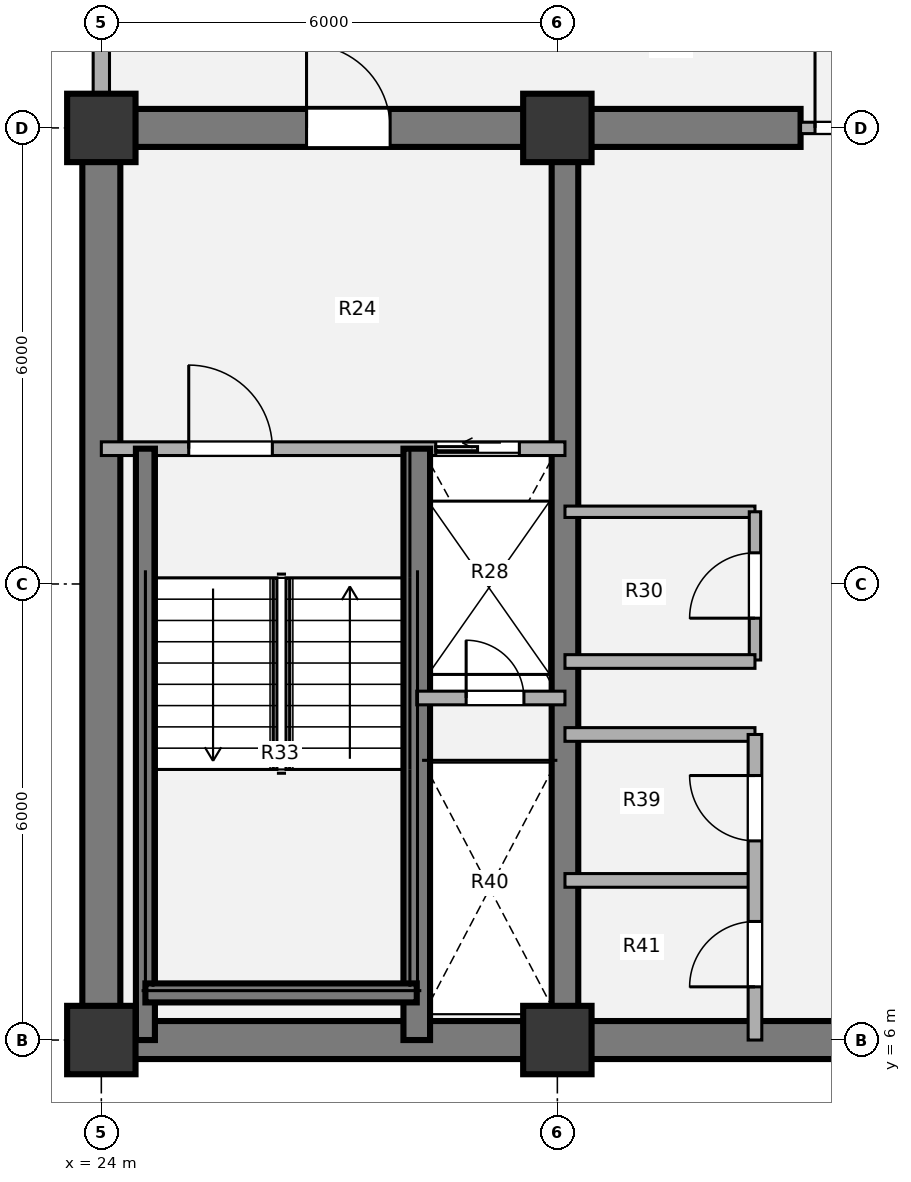
"""IFC4 building model, lengths in metres.
Left out: names, types, materials, properties, quantities, classifications, styles, units other than length and angle.
Written with IfcOpenShell. Run it as: python <this file> out.ifc"""

import sys

from ifc_helpers import new_model, si_unit, direction, frame, frame_2d, origin, origin_2d, place, context, subcontext, project, spatial, rectangle, extrude, source, transform, mapped, element, fill, save


model = new_model("IFC4")
c1 = context("Model", 3, precision=1e-05, world=origin(), true_north=direction((0.0, 1.0)))
c2 = subcontext(c1, "Body", "Model", "MODEL_VIEW")
j1 = project(units=[si_unit("LENGTHUNIT", "METRE"), si_unit("PLANEANGLEUNIT", "RADIAN")], contexts=[c1])
p1 = place(None, origin())
s1 = spatial("IfcSite", under=j1, at=p1, CompositionType="ELEMENT")
p2 = place(p1, origin())
s2 = spatial("IfcBuilding", under=s1, at=p2, CompositionType="ELEMENT")
p3 = place(p2, frame((0.0, 0.0, 97.38)))
s3 = spatial("IfcBuildingStorey", under=s2, at=p3, CompositionType="ELEMENT", Elevation=97.38)
m1 = source(origin(), c2, "Body", "SweptSolid", [
    extrude(rectangle(XDim=0.9, YDim=0.9, at=origin_2d()), origin(), (0.0, 0.0, 1.0), 3.78),
])
for number, where, z_axis, x_axis in (
    (1, (24.0, 6.0, 0.0), (0.0, 0.0, 1.0), (1.0, 0.0, 0.0)),
    (2, (30.0, 6.0, 0.0), (0.0, 0.0, 1.0), (1.0, 0.0, 0.0)),
    (3, (24.0, 18.0, 0.0), (0.0, 0.0, 1.0), (1.0, 0.0, 0.0)),
    (4, (30.0, 18.0, 0.0), (0.0, 0.0, 1.0), (1.0, 0.0, 0.0)),
):
    element("IfcColumn", number, at=place(p3, frame(where, z_axis=z_axis, x_axis=x_axis)), inside=s3, PredefinedType="COLUMN", context=c2, shape_type="MappedRepresentation", body=[
        mapped(m1, transform((0.0, 0.0, 0.0), x_axis=(1.0, 0.0, 0.0), y_axis=(0.0, 1.0, 0.0), z_axis=(0.0, 0.0, 1.0), scale=1.0)),
    ])
p4 = place(p3, frame((48.25, 6.0, 0.0), z_axis=(0.0, 0.0, 1.0), x_axis=(-1.0, 0.0, 0.0)))
e5 = element("IfcWall", 5, at=p4, inside=s3, PredefinedType="SHEAR", context=c2, shape_type="SweptSolid", body=[
    extrude(rectangle(XDim=24.5, YDim=0.5, at=frame_2d((12.25, 0.0))), origin(), (0.0, 0.0, 1.0), 3.78),
])
p5 = place(p3, frame((24.0, 6.0, 0.0), z_axis=(0.0, 0.0, 1.0), x_axis=(0.0, 1.0, 0.0)))
e6 = element("IfcWall", 6, at=p5, inside=s3, PredefinedType="SHEAR", context=c2, shape_type="SweptSolid", body=[
    extrude(rectangle(XDim=12.0, YDim=0.5, at=frame_2d((6.0, 0.0))), origin(), (0.0, 0.0, 1.0), 3.78),
])
p6 = place(p3, frame((23.75, 18.0, 0.0), z_axis=(0.0, 0.0, 1.0), x_axis=(1.0, 0.0, 0.0)))
e7 = element("IfcWall", 7, at=p6, inside=s3, PredefinedType="SHEAR", context=c2, shape_type="SweptSolid", body=[
    extrude(rectangle(XDim=9.45, YDim=0.5, at=frame_2d((4.725, 0.0))), origin(), (0.0, 0.0, 1.0), 3.78),
])
p7 = place(p6, frame((2.95, 0.0, 0.0)))
e8 = element("IfcOpeningElement", 8, at=p7, cuts=e7, PredefinedType="OPENING", context=c2, shape_type="SweptSolid", body=[
    extrude(rectangle(XDim=1.1, YDim=2.1, at=origin_2d()), frame((0.55, 0.26, 1.05), z_axis=(0.0, -1.0, 0.0), x_axis=(1.0, 0.0, 0.0)), (0.0, 0.0, 1.0), 0.52),
])
p8 = place(p3, frame((30.1, 6.0, 0.0), z_axis=(0.0, 0.0, 1.0), x_axis=(0.0, 1.0, 0.0)))
e9 = element("IfcWall", 9, at=p8, inside=s3, PredefinedType="SHEAR", context=c2, shape_type="SweptSolid", body=[
    extrude(rectangle(XDim=12.0, YDim=0.35, at=frame_2d((6.0, 0.0))), origin(), (0.0, 0.0, 1.0), 3.78),
])
p9 = place(p3, frame((24.0, 18.43, 0.0), z_axis=(0.0, 0.0, 1.0), x_axis=(0.0, 1.0, 0.0)))
e10 = element("IfcWall", 10, at=p9, inside=s3, PredefinedType="SOLIDWALL", context=c2, shape_type="SweptSolid", body=[
    extrude(rectangle(XDim=2.62, YDim=0.215, at=frame_2d((1.31, 0.0))), origin(), (0.0, 0.0, 1.0), 3.53),
])
p10 = place(p3, frame((30.1, 12.95, 0.0), z_axis=(0.0, 0.0, 1.0), x_axis=(1.0, 0.0, 0.0)))
e11 = element("IfcWall", 11, at=p10, inside=s3, PredefinedType="PARTITIONING", context=c2, shape_type="SweptSolid", body=[
    extrude(rectangle(XDim=2.5, YDim=0.15, at=frame_2d((1.25, 0.0))), origin(), (0.0, 0.0, 1.0), 3.5),
])
p11 = place(p3, frame((32.6, 11.0, 0.0), z_axis=(0.0, 0.0, 1.0), x_axis=(0.0, 1.0, 0.0)))
e12 = element("IfcWall", 12, at=p11, inside=s3, PredefinedType="PARTITIONING", context=c2, shape_type="SweptSolid", body=[
    extrude(rectangle(XDim=1.95, YDim=0.15, at=frame_2d((0.975, 0.0))), origin(), (0.0, 0.0, 1.0), 3.5),
])
p12 = place(p11, frame((0.55, 0.0, 0.0)))
e13 = element("IfcOpeningElement", 13, at=p12, cuts=e12, PredefinedType="OPENING", context=c2, shape_type="SweptSolid", body=[
    extrude(rectangle(XDim=0.86, YDim=2.1, at=origin_2d()), frame((0.43, 0.085, 1.05), z_axis=(0.0, -1.0, 0.0), x_axis=(1.0, 0.0, 0.0)), (0.0, 0.0, 1.0), 0.17),
])
for number, where, z_axis, x_axis in (
    (14, (30.1, 10.98, 0.0), (0.0, 0.0, 1.0), (1.0, 0.0, 0.0)),
    (15, (30.1, 8.1, 0.0), (0.0, 0.0, 1.0), (1.0, 0.0, 0.0)),
    (16, (30.1, 10.02, 0.0), (0.0, 0.0, 1.0), (1.0, 0.0, 0.0)),
):
    element("IfcWall", number, at=place(p3, frame(where, z_axis=z_axis, x_axis=x_axis)), inside=s3, PredefinedType="PARTITIONING", context=c2, shape_type="SweptSolid", body=[
        extrude(rectangle(XDim=2.5, YDim=0.18, at=frame_2d((1.25, 0.0))), origin(), (0.0, 0.0, 1.0), 3.5),
    ])
p13 = place(p3, frame((32.6, 6.0, 0.0), z_axis=(0.0, 0.0, 1.0), x_axis=(0.0, 1.0, 0.0)))
e17 = element("IfcWall", 17, at=p13, inside=s3, PredefinedType="PARTITIONING", context=c2, shape_type="SweptSolid", body=[
    extrude(rectangle(XDim=4.02, YDim=0.18, at=frame_2d((2.01, 0.0))), origin(), (0.0, 0.0, 1.0), 3.5),
])
p14 = place(p13, frame((0.7, 0.0, 0.0)))
e18 = element("IfcOpeningElement", 18, at=p14, cuts=e17, PredefinedType="OPENING", context=c2, shape_type="SweptSolid", body=[
    extrude(rectangle(XDim=0.86, YDim=2.1, at=origin_2d()), frame((0.43, 0.1, 1.05), z_axis=(0.0, -1.0, 0.0), x_axis=(1.0, 0.0, 0.0)), (0.0, 0.0, 1.0), 0.2),
])
p15 = place(p13, frame((2.62, 0.0, 0.0)))
e19 = element("IfcOpeningElement", 19, at=p15, cuts=e17, PredefinedType="OPENING", context=c2, shape_type="SweptSolid", body=[
    extrude(rectangle(XDim=0.86, YDim=2.1, at=origin_2d()), frame((0.43, 0.1, 1.05), z_axis=(0.0, -1.0, 0.0), x_axis=(1.0, 0.0, 0.0)), (0.0, 0.0, 1.0), 0.2),
])
p16 = place(p3, frame((33.2, 18.0, 0.0), z_axis=(0.0, 0.0, 1.0), x_axis=(1.0, 0.0, 0.0)))
e20 = element("IfcWall", 20, at=p16, inside=s3, PredefinedType="PARTITIONING", context=c2, shape_type="SweptSolid", body=[
    extrude(rectangle(XDim=5.6, YDim=0.15, at=frame_2d((2.8, 0.0))), origin(), (0.0, 0.0, 1.0), 2.315),
])
p17 = place(p16, frame((0.19, 0.0, 0.0)))
e21 = element("IfcOpeningElement", 21, at=p17, cuts=e20, PredefinedType="OPENING", context=c2, shape_type="SweptSolid", body=[
    extrude(rectangle(XDim=1.1, YDim=2.1, at=origin_2d()), frame((0.55, 0.085, 1.05), z_axis=(0.0, -1.0, 0.0), x_axis=(1.0, 0.0, 0.0)), (0.0, 0.0, 1.0), 0.17),
])
p18 = place(p16, frame((4.31, 0.0, 0.0)))
e22 = element("IfcOpeningElement", 22, at=p18, cuts=e20, PredefinedType="OPENING", context=c2, shape_type="SweptSolid", body=[
    extrude(rectangle(XDim=1.1, YDim=2.1, at=origin_2d()), frame((0.55, 0.085, 1.05), z_axis=(0.0, -1.0, 0.0), x_axis=(1.0, 0.0, 0.0)), (0.0, 0.0, 1.0), 0.17),
])
p19 = place(p3, frame((24.0, 13.78, 0.0), z_axis=(0.0, 0.0, 1.0), x_axis=(1.0, 0.0, 0.0)))
e23 = element("IfcWall", 23, at=p19, inside=s3, PredefinedType="PARTITIONING", context=c2, shape_type="SweptSolid", body=[
    extrude(rectangle(XDim=6.1, YDim=0.18, at=frame_2d((3.05, 0.0))), origin(), (0.0, 0.0, 1.0), 3.5),
])
p20 = place(p19, frame((1.15, 0.0, 0.0)))
e24 = element("IfcOpeningElement", 24, at=p20, cuts=e23, PredefinedType="OPENING", context=c2, shape_type="SweptSolid", body=[
    extrude(rectangle(XDim=1.1, YDim=2.1, at=origin_2d()), frame((0.55, 0.1, 1.05), z_axis=(0.0, -1.0, 0.0), x_axis=(1.0, 0.0, 0.0)), (0.0, 0.0, 1.0), 0.2),
])
p21 = place(p19, frame((4.4, 0.0, 0.0)))
e25 = element("IfcOpeningElement", 25, at=p21, cuts=e23, PredefinedType="OPENING", context=c2, shape_type="SweptSolid", body=[
    extrude(rectangle(XDim=1.1, YDim=2.1, at=origin_2d()), frame((0.55, 0.1, 1.05), z_axis=(0.0, -1.0, 0.0), x_axis=(1.0, 0.0, 0.0)), (0.0, 0.0, 1.0), 0.2),
])
p22 = place(p3, frame((28.15, 6.0, 0.0), z_axis=(0.0, 0.0, 1.0), x_axis=(0.0, 1.0, 0.0)))
e26 = element("IfcWall", 26, at=p22, inside=s3, PredefinedType="SHEAR", context=c2, shape_type="SweptSolid", body=[
    extrude(rectangle(XDim=7.78, YDim=0.35, at=frame_2d((3.89, 0.0))), origin(), (0.0, 0.0, 1.0), 3.85),
])
p23 = place(p3, frame((24.58, 6.0, 0.0), z_axis=(0.0, 0.0, 1.0), x_axis=(0.0, 1.0, 0.0)))
e27 = element("IfcWall", 27, at=p23, inside=s3, PredefinedType="SHEAR", context=c2, shape_type="SweptSolid", body=[
    extrude(rectangle(XDim=7.78, YDim=0.25, at=frame_2d((3.89, 0.0))), origin(), (0.0, 0.0, 1.0), 3.85),
])
p24 = place(p3, frame((24.58, 6.62, 0.0), z_axis=(0.0, 0.0, 1.0), x_axis=(1.0, 0.0, 0.0)))
e28 = element("IfcWall", 28, at=p24, inside=s3, PredefinedType="SHEAR", context=c2, shape_type="SweptSolid", body=[
    extrude(rectangle(XDim=3.57, YDim=0.25, at=frame_2d((1.785, 0.0))), origin(), (0.0, 0.0, 1.0), 3.85),
])
p25 = place(p3, frame((28.15, 10.5, 0.0), z_axis=(0.0, 0.0, 1.0), x_axis=(1.0, 0.0, 0.0)))
e29 = element("IfcWall", 29, at=p25, inside=s3, PredefinedType="PARTITIONING", context=c2, shape_type="SweptSolid", body=[
    extrude(rectangle(XDim=1.95, YDim=0.18, at=frame_2d((0.975, 0.0))), origin(), (0.0, 0.0, 1.0), 3.5),
])
p26 = place(p25, frame((0.65, 0.0, 0.0)))
e30 = element("IfcOpeningElement", 30, at=p26, cuts=e29, PredefinedType="OPENING", context=c2, shape_type="SweptSolid", body=[
    extrude(rectangle(XDim=0.76, YDim=2.05, at=origin_2d()), frame((0.38, 0.1, 1.025), z_axis=(0.0, -1.0, 0.0), x_axis=(1.0, 0.0, 0.0)), (0.0, 0.0, 1.0), 0.2),
])
m2 = source(origin(), c2, "Body", "SweptSolid", [
    extrude(rectangle(XDim=0.86, YDim=2.1, at=origin_2d()), frame((0.43, 0.025, 1.05), z_axis=(0.0, -1.0, 0.0), x_axis=(1.0, 0.0, 0.0)), (0.0, 0.0, 1.0), 0.05),
])
p27 = place(p12, origin())
e31 = element("IfcDoor", 31, at=p27, inside=s3, OperationType="SINGLE_SWING_LEFT", PredefinedType="DOOR", context=c2, shape_type="MappedRepresentation", body=[
    mapped(m2, transform((0.0, 0.0, 0.0), x_axis=(1.0, 0.0, 0.0), y_axis=(0.0, 1.0, 0.0), z_axis=(0.0, 0.0, 1.0), scale=1.0)),
])
fill(e13, e31)
p28 = place(p14, origin())
e32 = element("IfcDoor", 32, at=p28, inside=s3, OperationType="SINGLE_SWING_LEFT", PredefinedType="DOOR", context=c2, shape_type="MappedRepresentation", body=[
    mapped(m2, transform((0.0, 0.0, 0.0), x_axis=(1.0, 0.0, 0.0), y_axis=(0.0, 1.0, 0.0), z_axis=(0.0, 0.0, 1.0), scale=1.0)),
])
fill(e18, e32)
p29 = place(p15, origin())
e33 = element("IfcDoor", 33, at=p29, inside=s3, OperationType="SINGLE_SWING_RIGHT", PredefinedType="DOOR", context=c2, shape_type="MappedRepresentation", body=[
    mapped(m2, transform((0.0, 0.0, 0.0), x_axis=(1.0, 0.0, 0.0), y_axis=(0.0, 1.0, 0.0), z_axis=(0.0, 0.0, 1.0), scale=1.0)),
])
fill(e19, e33)
m3 = source(origin(), c2, "Body", "SweptSolid", [
    extrude(rectangle(XDim=1.1, YDim=2.1, at=origin_2d()), frame((0.55, 0.025, 1.05), z_axis=(0.0, -1.0, 0.0), x_axis=(1.0, 0.0, 0.0)), (0.0, 0.0, 1.0), 0.05),
])
p30 = place(p17, origin())
e34 = element("IfcDoor", 34, at=p30, inside=s3, OperationType="SINGLE_SWING_LEFT", PredefinedType="DOOR", context=c2, shape_type="MappedRepresentation", body=[
    mapped(m3, transform((0.0, 0.0, 0.0), x_axis=(1.0, 0.0, 0.0), y_axis=(0.0, 1.0, 0.0), z_axis=(0.0, 0.0, 1.0), scale=1.0)),
])
fill(e21, e34)
m4 = source(origin(), c2, "Body", "SweptSolid", [
    extrude(rectangle(XDim=1.1, YDim=2.1, at=origin_2d()), frame((0.55, 0.025, 1.05), z_axis=(0.0, -1.0, 0.0), x_axis=(1.0, 0.0, 0.0)), (0.0, 0.0, 1.0), 0.05),
])
p31 = place(p20, origin())
e35 = element("IfcDoor", 35, at=p31, inside=s3, OperationType="SINGLE_SWING_LEFT", PredefinedType="DOOR", context=c2, shape_type="MappedRepresentation", body=[
    mapped(m4, transform((0.0, 0.0, 0.0), x_axis=(1.0, 0.0, 0.0), y_axis=(0.0, 1.0, 0.0), z_axis=(0.0, 0.0, 1.0), scale=1.0)),
])
fill(e24, e35)
m5 = source(origin(), c2, "Body", "SweptSolid", [
    extrude(rectangle(XDim=1.1, YDim=2.1, at=origin_2d()), frame((0.55, 0.025, 1.05), z_axis=(0.0, -1.0, 0.0), x_axis=(1.0, 0.0, 0.0)), (0.0, 0.0, 1.0), 0.05),
])
p32 = place(p21, origin())
e36 = element("IfcDoor", 36, at=p32, inside=s3, OperationType="SLIDING_TO_LEFT", PredefinedType="DOOR", context=c2, shape_type="MappedRepresentation", body=[
    mapped(m5, transform((0.0, 0.0, 0.0), x_axis=(1.0, 0.0, 0.0), y_axis=(0.0, 1.0, 0.0), z_axis=(0.0, 0.0, 1.0), scale=1.0)),
])
fill(e25, e36)
m6 = source(origin(), c2, "Body", "SweptSolid", [
    extrude(rectangle(XDim=0.76, YDim=2.05, at=origin_2d()), frame((0.38, 0.025, 1.025), z_axis=(0.0, -1.0, 0.0), x_axis=(1.0, 0.0, 0.0)), (0.0, 0.0, 1.0), 0.05),
])
p33 = place(p26, origin())
e37 = element("IfcDoor", 37, at=p33, inside=s3, OperationType="SINGLE_SWING_LEFT", PredefinedType="DOOR", context=c2, shape_type="MappedRepresentation", body=[
    mapped(m6, transform((0.0, 0.0, 0.0), x_axis=(1.0, 0.0, 0.0), y_axis=(0.0, 1.0, 0.0), z_axis=(0.0, 0.0, 1.0), scale=1.0)),
])
fill(e30, e37)
p34 = place(p7, origin())
e38 = element("IfcDoor", 38, at=p34, inside=s3, OperationType="SINGLE_SWING_LEFT", PredefinedType="DOOR", context=c2, shape_type="MappedRepresentation", body=[
    mapped(m3, transform((0.0, 0.0, 0.0), x_axis=(1.0, 0.0, 0.0), y_axis=(0.0, 1.0, 0.0), z_axis=(0.0, 0.0, 1.0), scale=1.0)),
])
fill(e8, e38)
save(model, sys.argv[1])
